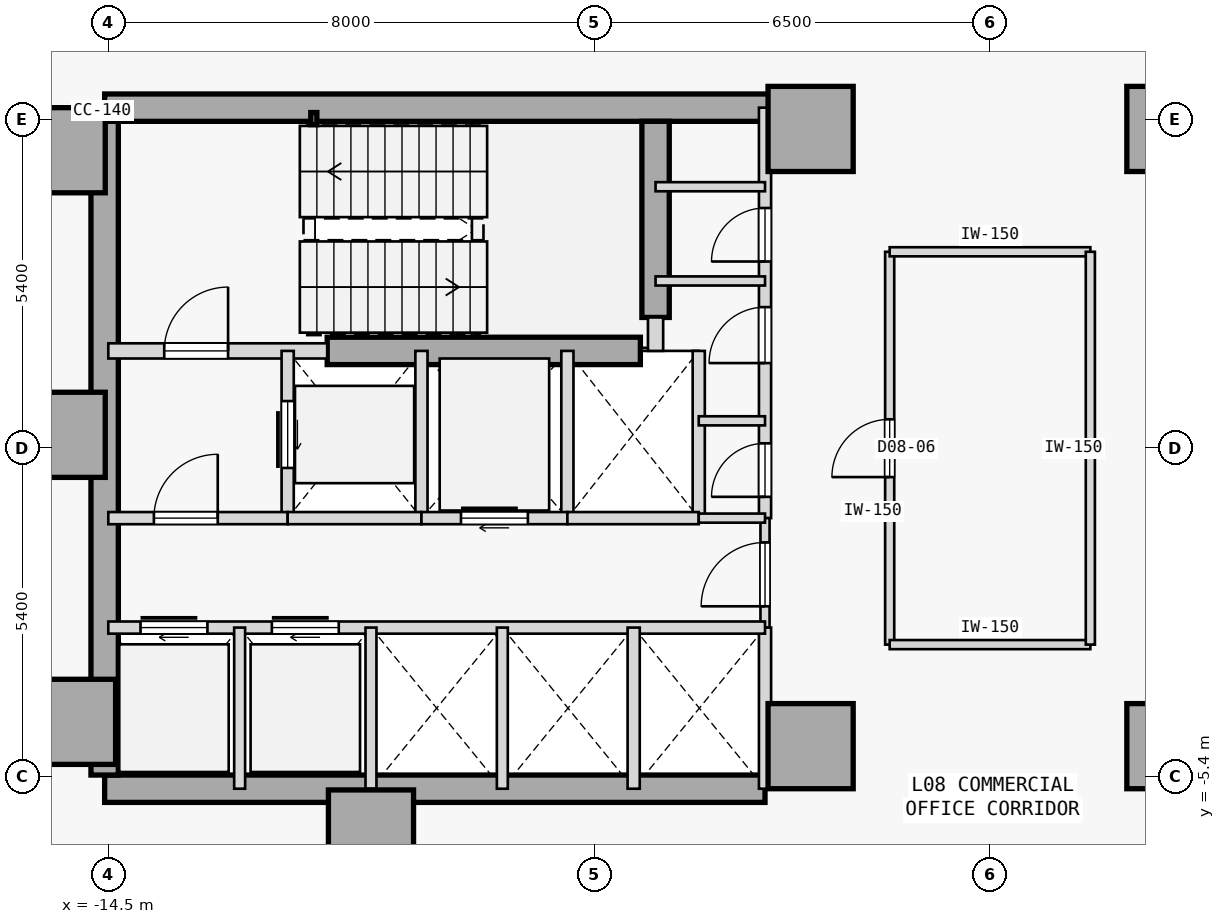
"""IFC4 building model, lengths in metres.
Left out: names, types, materials, properties, quantities, classifications, styles, units other than length and angle.
Written with IfcOpenShell. Run it as: python <this file> out.ifc"""

import sys

from ifc_helpers import new_model, si_unit, direction, frame, frame_2d, origin, origin_2d, place, context, subcontext, project, spatial, rectangle, hollow_rectangle, extrude, element, fill, save


model = new_model("IFC4")
c1 = context("Model", 3, precision=1e-05, world=origin(), true_north=direction((0.0, 1.0)))
c2 = subcontext(c1, "Body", "Model", "MODEL_VIEW")
j1 = project(units=[si_unit("LENGTHUNIT", "METRE"), si_unit("PLANEANGLEUNIT", "RADIAN")], contexts=[c1])
p1 = place(None, origin())
s1 = spatial("IfcSite", under=j1, at=p1, CompositionType="ELEMENT")
p2 = place(p1, origin())
s2 = spatial("IfcBuilding", under=s1, at=p2, CompositionType="ELEMENT")
p3 = place(p2, frame((0.0, 0.0, 37.0)))
s3 = spatial("IfcBuildingStorey", under=s2, at=p3, CompositionType="ELEMENT", Elevation=37.0)
for number, where, z_axis, x_axis in (
    (1, (-15.25, 4.9, 0.0), (0.0, 0.0, 1.0), (1.0, 0.0, 0.0)),
    (2, (-15.25, 0.22, 0.0), (0.0, 0.0, 1.0), (1.0, 0.0, 0.0)),
    (3, (-15.08, -4.5, 0.0), (0.0, 0.0, 1.0), (1.0, 0.0, 0.0)),
    (4, (-10.18, -6.32, 0.0), (0.0, 0.0, 1.0), (1.0, 0.0, 0.0)),
    (5, (-2.95, -4.9, 0.0), (0.0, 0.0, 1.0), (1.0, 0.0, 0.0)),
    (6, (-2.95, 5.25, 0.0), (0.0, 0.0, 1.0), (1.0, 0.0, 0.0)),
    (7, (2.95, -4.9, 0.0), (0.0, 0.0, 1.0), (1.0, 0.0, 0.0)),
    (8, (2.95, 5.25, 0.0), (0.0, 0.0, 1.0), (1.0, 0.0, 0.0)),
):
    element("IfcColumn", number, at=place(p3, frame(where, z_axis=z_axis, x_axis=x_axis)), inside=s3, PredefinedType="COLUMN", context=c2, shape_type="SweptSolid", body=[
        extrude(rectangle(XDim=1.4, YDim=1.4, at=origin_2d()), origin(), (0.0, 0.0, 1.0), 3.8),
    ])
p4 = place(p3, frame((-14.56, 5.6, 0.0), z_axis=(0.0, 0.0, 1.0), x_axis=(1.0, 0.0, 0.0)))
e9 = element("IfcWall", 9, at=p4, inside=s3, PredefinedType="SHEAR", context=c2, shape_type="SweptSolid", body=[
    extrude(rectangle(XDim=11.41, YDim=0.45, at=frame_2d((5.705, 0.0))), origin(), (0.0, 0.0, 1.0), 3.575),
])
p5 = place(p3, frame((-14.56, -5.6, 0.0), z_axis=(0.0, 0.0, 1.0), x_axis=(1.0, 0.0, 0.0)))
e10 = element("IfcWall", 10, at=p5, inside=s3, PredefinedType="SHEAR", context=c2, shape_type="SweptSolid", body=[
    extrude(rectangle(XDim=10.86, YDim=0.45, at=frame_2d((5.43, 0.0))), origin(), (0.0, 0.0, 1.0), 3.575),
])
p6 = place(p3, frame((-14.56, -5.375, 0.0), z_axis=(0.0, 0.0, 1.0), x_axis=(0.0, 1.0, 0.0)))
e11 = element("IfcWall", 11, at=p6, inside=s3, PredefinedType="SHEAR", context=c2, shape_type="SweptSolid", body=[
    extrude(rectangle(XDim=10.75, YDim=0.45, at=frame_2d((5.375, 0.0))), origin(), (0.0, 0.0, 1.0), 3.575),
])
p7 = place(p3, frame((-5.5, 2.15, 0.0), z_axis=(0.0, 0.0, 1.0), x_axis=(0.0, 1.0, 0.0)))
e12 = element("IfcWall", 12, at=p7, inside=s3, PredefinedType="SHEAR", context=c2, shape_type="SweptSolid", body=[
    extrude(rectangle(XDim=3.225, YDim=0.45, at=frame_2d((1.613, 0.0))), origin(), (0.0, 0.0, 1.0), 3.575),
])
p8 = place(p3, frame((-10.9, 1.6, 0.0), z_axis=(0.0, 0.0, 1.0), x_axis=(1.0, 0.0, 0.0)))
e13 = element("IfcWall", 13, at=p8, inside=s3, PredefinedType="SHEAR", context=c2, shape_type="SweptSolid", body=[
    extrude(rectangle(XDim=5.15, YDim=0.45, at=frame_2d((2.575, 0.0))), origin(), (0.0, 0.0, 1.0), 3.575),
])
p9 = place(p3, frame((-11.12, 5.42, 0.0), z_axis=(0.0, 0.0, 1.0), x_axis=(1.0, 0.0, 0.0)))
e14 = element("IfcColumn", 14, at=p9, inside=s3, PredefinedType="COLUMN", context=c2, shape_type="SweptSolid", body=[
    extrude(hollow_rectangle(XDim=0.1, YDim=0.2, WallThickness=0.008, at=origin_2d()), origin(), (0.0, 0.0, 1.0), 3.8),
])
p10 = place(p3, frame((-14.5, 1.6, 0.0), z_axis=(0.0, 0.0, 1.0), x_axis=(1.0, 0.0, 0.0)))
e15 = element("IfcWall", 15, at=p10, inside=s3, PredefinedType="STANDARD", context=c2, shape_type="SweptSolid", body=[
    extrude(rectangle(XDim=3.6, YDim=0.25, at=frame_2d((1.8, 0.0))), origin(), (0.0, 0.0, 1.0), 3.575),
])
p11 = place(p10, frame((0.92, 0.0, 0.0)))
e16 = element("IfcOpeningElement", 16, at=p11, cuts=e15, PredefinedType="OPENING", context=c2, shape_type="SweptSolid", body=[
    extrude(rectangle(XDim=1.05, YDim=2.15, at=frame_2d((0.525, 1.075))), frame((0.0, 0.135, 0.0), z_axis=(0.0, -1.0, 0.0), x_axis=(1.0, 0.0, 0.0)), (0.0, 0.0, 1.0), 0.27),
])
p12 = place(p3, frame((-5.5, 1.6, 0.0), z_axis=(0.0, 0.0, 1.0), x_axis=(0.0, 1.0, 0.0)))
e17 = element("IfcWall", 17, at=p12, inside=s3, PredefinedType="STANDARD", context=c2, shape_type="SweptSolid", body=[
    extrude(rectangle(XDim=0.55, YDim=0.25, at=frame_2d((0.275, 0.0))), origin(), (0.0, 0.0, 1.0), 3.575),
])
p13 = place(p3, frame((-3.7, -1.15, 0.0), z_axis=(0.0, 0.0, 1.0), x_axis=(0.0, 1.0, 0.0)))
e18 = element("IfcWall", 18, at=p13, inside=s3, PredefinedType="STANDARD", context=c2, shape_type="SweptSolid", body=[
    extrude(rectangle(XDim=6.75, YDim=0.2, at=frame_2d((3.375, 0.0))), origin(), (0.0, 0.0, 1.0), 3.575),
])
p14 = place(p13, frame((0.35, 0.0, 0.0)))
e19 = element("IfcOpeningElement", 19, at=p14, cuts=e18, PredefinedType="OPENING", context=c2, shape_type="SweptSolid", body=[
    extrude(rectangle(XDim=0.88, YDim=2.15, at=frame_2d((0.44, 1.075))), frame((0.0, 0.11, 0.0), z_axis=(0.0, -1.0, 0.0), x_axis=(1.0, 0.0, 0.0)), (0.0, 0.0, 1.0), 0.22),
])
p15 = place(p13, frame((2.55, 0.0, 0.0)))
e20 = element("IfcOpeningElement", 20, at=p15, cuts=e18, PredefinedType="OPENING", context=c2, shape_type="SweptSolid", body=[
    extrude(rectangle(XDim=0.92, YDim=2.15, at=frame_2d((0.46, 1.075))), frame((0.0, 0.11, 0.0), z_axis=(0.0, -1.0, 0.0), x_axis=(1.0, 0.0, 0.0)), (0.0, 0.0, 1.0), 0.22),
])
p16 = place(p13, frame((4.22, 0.0, 0.0)))
e21 = element("IfcOpeningElement", 21, at=p16, cuts=e18, PredefinedType="OPENING", context=c2, shape_type="SweptSolid", body=[
    extrude(rectangle(XDim=0.88, YDim=2.15, at=frame_2d((0.44, 1.075))), frame((0.0, 0.11, 0.0), z_axis=(0.0, -1.0, 0.0), x_axis=(1.0, 0.0, 0.0)), (0.0, 0.0, 1.0), 0.22),
])
p17 = place(p3, frame((-3.7, -2.95, 0.0), z_axis=(0.0, 0.0, 1.0), x_axis=(0.0, 1.0, 0.0)))
e22 = element("IfcWall", 22, at=p17, inside=s3, PredefinedType="PARTITIONING", context=c2, shape_type="SweptSolid", body=[
    extrude(rectangle(XDim=1.8, YDim=0.15, at=frame_2d((0.9, 0.0))), origin(), (0.0, 0.0, 1.0), 3.575),
])
p18 = place(p17, frame((0.35, 0.0, 0.0)))
e23 = element("IfcOpeningElement", 23, at=p18, cuts=e22, PredefinedType="OPENING", context=c2, shape_type="SweptSolid", body=[
    extrude(rectangle(XDim=1.05, YDim=2.18, at=frame_2d((0.525, 1.09))), frame((0.0, 0.085, 0.0), z_axis=(0.0, -1.0, 0.0), x_axis=(1.0, 0.0, 0.0)), (0.0, 0.0, 1.0), 0.17),
])
p19 = place(p3, frame((-3.7, -5.6, 0.0), z_axis=(0.0, 0.0, 1.0), x_axis=(0.0, 1.0, 0.0)))
e24 = element("IfcWall", 24, at=p19, inside=s3, PredefinedType="STANDARD", context=c2, shape_type="SweptSolid", body=[
    extrude(rectangle(XDim=2.65, YDim=0.2, at=frame_2d((1.325, 0.0))), origin(), (0.0, 0.0, 1.0), 3.575),
])
p20 = place(p3, frame((-11.55, -1.15, 0.0), z_axis=(0.0, 0.0, 1.0), x_axis=(0.0, 1.0, 0.0)))
e25 = element("IfcWall", 25, at=p20, inside=s3, PredefinedType="STANDARD", context=c2, shape_type="SweptSolid", body=[
    extrude(rectangle(XDim=2.75, YDim=0.2, at=frame_2d((1.375, 0.0))), origin(), (0.0, 0.0, 1.0), 3.575),
])
p21 = place(p20, frame((0.825, 0.0, 0.0)))
e26 = element("IfcOpeningElement", 26, at=p21, cuts=e25, PredefinedType="OPENING", context=c2, shape_type="SweptSolid", body=[
    extrude(rectangle(XDim=1.1, YDim=2.15, at=frame_2d((0.55, 1.075))), frame((0.0, 0.11, 0.0), z_axis=(0.0, -1.0, 0.0), x_axis=(1.0, 0.0, 0.0)), (0.0, 0.0, 1.0), 0.22),
])
p22 = place(p3, frame((-9.35, -1.15, 0.0), z_axis=(0.0, 0.0, 1.0), x_axis=(0.0, 1.0, 0.0)))
e27 = element("IfcWall", 27, at=p22, inside=s3, PredefinedType="STANDARD", context=c2, shape_type="SweptSolid", body=[
    extrude(rectangle(XDim=2.75, YDim=0.2, at=frame_2d((1.375, 0.0))), origin(), (0.0, 0.0, 1.0), 3.575),
])
p23 = place(p3, frame((-14.5, -1.15, 0.0), z_axis=(0.0, 0.0, 1.0), x_axis=(1.0, 0.0, 0.0)))
e28 = element("IfcWall", 28, at=p23, inside=s3, PredefinedType="STANDARD", context=c2, shape_type="SweptSolid", body=[
    extrude(rectangle(XDim=2.95, YDim=0.2, at=frame_2d((1.475, 0.0))), origin(), (0.0, 0.0, 1.0), 3.575),
])
p24 = place(p23, frame((0.75, 0.0, 0.0)))
e29 = element("IfcOpeningElement", 29, at=p24, cuts=e28, PredefinedType="OPENING", context=c2, shape_type="SweptSolid", body=[
    extrude(rectangle(XDim=1.05, YDim=2.18, at=frame_2d((0.525, 1.09))), frame((0.0, 0.11, 0.0), z_axis=(0.0, -1.0, 0.0), x_axis=(1.0, 0.0, 0.0)), (0.0, 0.0, 1.0), 0.22),
])
p25 = place(p3, frame((-11.55, -1.15, 0.0), z_axis=(0.0, 0.0, 1.0), x_axis=(1.0, 0.0, 0.0)))
e30 = element("IfcWall", 30, at=p25, inside=s3, PredefinedType="STANDARD", context=c2, shape_type="SweptSolid", body=[
    extrude(rectangle(XDim=2.2, YDim=0.2, at=frame_2d((1.1, 0.0))), origin(), (0.0, 0.0, 1.0), 3.575),
])
p26 = place(p3, frame((-6.95, -1.15, 0.0), z_axis=(0.0, 0.0, 1.0), x_axis=(0.0, 1.0, 0.0)))
e31 = element("IfcWall", 31, at=p26, inside=s3, PredefinedType="STANDARD", context=c2, shape_type="SweptSolid", body=[
    extrude(rectangle(XDim=2.75, YDim=0.2, at=frame_2d((1.375, 0.0))), origin(), (0.0, 0.0, 1.0), 3.575),
])
p27 = place(p3, frame((-9.35, -1.15, 0.0), z_axis=(0.0, 0.0, 1.0), x_axis=(1.0, 0.0, 0.0)))
e32 = element("IfcWall", 32, at=p27, inside=s3, PredefinedType="STANDARD", context=c2, shape_type="SweptSolid", body=[
    extrude(rectangle(XDim=2.4, YDim=0.2, at=frame_2d((1.2, 0.0))), origin(), (0.0, 0.0, 1.0), 3.575),
])
p28 = place(p27, frame((0.65, 0.0, 0.0)))
e33 = element("IfcOpeningElement", 33, at=p28, cuts=e32, PredefinedType="OPENING", context=c2, shape_type="SweptSolid", body=[
    extrude(rectangle(XDim=1.1, YDim=2.15, at=frame_2d((0.55, 1.075))), frame((0.0, 0.11, 0.0), z_axis=(0.0, -1.0, 0.0), x_axis=(1.0, 0.0, 0.0)), (0.0, 0.0, 1.0), 0.22),
])
p29 = place(p3, frame((-4.79, -1.15, 0.0), z_axis=(0.0, 0.0, 1.0), x_axis=(0.0, 1.0, 0.0)))
e34 = element("IfcWall", 34, at=p29, inside=s3, PredefinedType="STANDARD", context=c2, shape_type="SweptSolid", body=[
    extrude(rectangle(XDim=2.75, YDim=0.2, at=frame_2d((1.375, 0.0))), origin(), (0.0, 0.0, 1.0), 3.575),
])
p30 = place(p3, frame((-6.95, -1.15, 0.0), z_axis=(0.0, 0.0, 1.0), x_axis=(1.0, 0.0, 0.0)))
e35 = element("IfcWall", 35, at=p30, inside=s3, PredefinedType="STANDARD", context=c2, shape_type="SweptSolid", body=[
    extrude(rectangle(XDim=2.16, YDim=0.2, at=frame_2d((1.08, 0.0))), origin(), (0.0, 0.0, 1.0), 3.575),
])
p31 = place(p3, frame((-4.79, -1.15, 0.0), z_axis=(0.0, 0.0, 1.0), x_axis=(1.0, 0.0, 0.0)))
e36 = element("IfcWall", 36, at=p31, inside=s3, PredefinedType="PARTITIONING", context=c2, shape_type="SweptSolid", body=[
    extrude(rectangle(XDim=1.09, YDim=0.15, at=frame_2d((0.545, 0.0))), origin(), (0.0, 0.0, 1.0), 3.575),
])
p32 = place(p3, frame((-14.5, -2.95, 0.0), z_axis=(0.0, 0.0, 1.0), x_axis=(1.0, 0.0, 0.0)))
e37 = element("IfcWall", 37, at=p32, inside=s3, PredefinedType="STANDARD", context=c2, shape_type="SweptSolid", body=[
    extrude(rectangle(XDim=10.8, YDim=0.2, at=frame_2d((5.4, 0.0))), origin(), (0.0, 0.0, 1.0), 3.575),
])
p33 = place(p32, frame((0.53, 0.0, 0.0)))
e38 = element("IfcOpeningElement", 38, at=p33, cuts=e37, PredefinedType="OPENING", context=c2, shape_type="SweptSolid", body=[
    extrude(rectangle(XDim=1.1, YDim=2.15, at=frame_2d((0.55, 1.075))), frame((0.0, 0.11, 0.0), z_axis=(0.0, -1.0, 0.0), x_axis=(1.0, 0.0, 0.0)), (0.0, 0.0, 1.0), 0.22),
])
p34 = place(p32, frame((2.69, 0.0, 0.0)))
e39 = element("IfcOpeningElement", 39, at=p34, cuts=e37, PredefinedType="OPENING", context=c2, shape_type="SweptSolid", body=[
    extrude(rectangle(XDim=1.1, YDim=2.15, at=frame_2d((0.55, 1.075))), frame((0.0, 0.11, 0.0), z_axis=(0.0, -1.0, 0.0), x_axis=(1.0, 0.0, 0.0)), (0.0, 0.0, 1.0), 0.22),
])
p35 = place(p3, frame((-5.86, -5.6, 0.0), z_axis=(0.0, 0.0, 1.0), x_axis=(0.0, 1.0, 0.0)))
e40 = element("IfcWall", 40, at=p35, inside=s3, PredefinedType="STANDARD", context=c2, shape_type="SweptSolid", body=[
    extrude(rectangle(XDim=2.65, YDim=0.2, at=frame_2d((1.325, 0.0))), origin(), (0.0, 0.0, 1.0), 3.575),
])
for number, where, z_axis, x_axis in (
    (41, (-12.34, -5.6, 0.0), (0.0, 0.0, 1.0), (0.0, 1.0, 0.0)),
    (42, (-10.18, -5.6, 0.0), (0.0, 0.0, 1.0), (0.0, 1.0, 0.0)),
    (43, (-8.02, -5.6, 0.0), (0.0, 0.0, 1.0), (0.0, 1.0, 0.0)),
):
    element("IfcWall", number, at=place(p3, frame(where, z_axis=z_axis, x_axis=x_axis)), inside=s3, PredefinedType="STANDARD", context=c2, shape_type="SweptSolid", body=[
        extrude(rectangle(XDim=2.65, YDim=0.18, at=frame_2d((1.325, 0.0))), origin(), (0.0, 0.0, 1.0), 3.575),
    ])
p36 = place(p3, frame((-5.5, 4.3, 0.0), z_axis=(0.0, 0.0, 1.0), x_axis=(1.0, 0.0, 0.0)))
e44 = element("IfcWall", 44, at=p36, inside=s3, PredefinedType="PARTITIONING", context=c2, shape_type="SweptSolid", body=[
    extrude(rectangle(XDim=1.8, YDim=0.15, at=frame_2d((0.9, 0.0))), origin(), (0.0, 0.0, 1.0), 3.575),
])
p37 = place(p3, frame((-4.79, 0.45, 0.0), z_axis=(0.0, 0.0, 1.0), x_axis=(1.0, 0.0, 0.0)))
e45 = element("IfcWall", 45, at=p37, inside=s3, PredefinedType="PARTITIONING", context=c2, shape_type="SweptSolid", body=[
    extrude(rectangle(XDim=1.09, YDim=0.15, at=frame_2d((0.545, 0.0))), origin(), (0.0, 0.0, 1.0), 3.575),
])
p38 = place(p3, frame((-5.5, 2.75, 0.0), z_axis=(0.0, 0.0, 1.0), x_axis=(1.0, 0.0, 0.0)))
e46 = element("IfcWall", 46, at=p38, inside=s3, PredefinedType="PARTITIONING", context=c2, shape_type="SweptSolid", body=[
    extrude(rectangle(XDim=1.8, YDim=0.15, at=frame_2d((0.9, 0.0))), origin(), (0.0, 0.0, 1.0), 3.575),
])
p39 = place(p3, frame((-1.65, -3.23, 0.0), z_axis=(0.0, 0.0, 1.0), x_axis=(0.0, 1.0, 0.0)))
e47 = element("IfcWall", 47, at=p39, inside=s3, PredefinedType="PARTITIONING", context=c2, shape_type="SweptSolid", body=[
    extrude(rectangle(XDim=6.46, YDim=0.15, at=frame_2d((3.23, 0.0))), origin(), (0.0, 0.0, 1.0), 3.575),
])
p40 = place(p39, frame((2.755, 0.0, 0.0)))
e48 = element("IfcOpeningElement", 48, at=p40, cuts=e47, PredefinedType="OPENING", context=c2, shape_type="SweptSolid", body=[
    extrude(rectangle(XDim=0.95, YDim=2.15, at=frame_2d((0.475, 1.075))), frame((0.0, 0.085, 0.0), z_axis=(0.0, -1.0, 0.0), x_axis=(1.0, 0.0, 0.0)), (0.0, 0.0, 1.0), 0.17),
])
for number, where, z_axis, x_axis in (
    (49, (-1.65, -3.23, 0.0), (0.0, 0.0, 1.0), (1.0, 0.0, 0.0)),
    (50, (-1.65, 3.23, 0.0), (0.0, 0.0, 1.0), (1.0, 0.0, 0.0)),
):
    element("IfcWall", number, at=place(p3, frame(where, z_axis=z_axis, x_axis=x_axis)), inside=s3, PredefinedType="PARTITIONING", context=c2, shape_type="SweptSolid", body=[
        extrude(rectangle(XDim=3.3, YDim=0.15, at=frame_2d((1.65, 0.0))), origin(), (0.0, 0.0, 1.0), 3.575),
    ])
p41 = place(p3, frame((1.65, -3.23, 0.0), z_axis=(0.0, 0.0, 1.0), x_axis=(0.0, 1.0, 0.0)))
e51 = element("IfcWall", 51, at=p41, inside=s3, PredefinedType="PARTITIONING", context=c2, shape_type="SweptSolid", body=[
    extrude(rectangle(XDim=6.46, YDim=0.15, at=frame_2d((3.23, 0.0))), origin(), (0.0, 0.0, 1.0), 3.575),
])
p42 = place(p11, origin())
e52 = element("IfcDoor", 52, at=p42, inside=s3, OperationType="SINGLE_SWING_RIGHT", PredefinedType="DOOR", context=c2, shape_type="SweptSolid", body=[
    extrude(rectangle(XDim=1.05, YDim=2.15, at=frame_2d((0.525, 1.075))), frame((0.0, 0.025, 0.0), z_axis=(0.0, -1.0, 0.0), x_axis=(1.0, 0.0, 0.0)), (0.0, 0.0, 1.0), 0.05),
])
fill(e16, e52)
p43 = place(p24, origin())
e53 = element("IfcDoor", 53, at=p43, inside=s3, OperationType="SINGLE_SWING_RIGHT", PredefinedType="DOOR", context=c2, shape_type="SweptSolid", body=[
    extrude(rectangle(XDim=1.05, YDim=2.18, at=frame_2d((0.525, 1.09))), frame((0.0, 0.025, 0.0), z_axis=(0.0, -1.0, 0.0), x_axis=(1.0, 0.0, 0.0)), (0.0, 0.0, 1.0), 0.05),
])
fill(e29, e53)
p44 = place(p18, origin())
e54 = element("IfcDoor", 54, at=p44, inside=s3, OperationType="SINGLE_SWING_LEFT", PredefinedType="DOOR", context=c2, shape_type="SweptSolid", body=[
    extrude(rectangle(XDim=1.05, YDim=2.18, at=frame_2d((0.525, 1.09))), frame((0.0, 0.025, 0.0), z_axis=(0.0, -1.0, 0.0), x_axis=(1.0, 0.0, 0.0)), (0.0, 0.0, 1.0), 0.05),
])
fill(e23, e54)
p45 = place(p21, origin())
e55 = element("IfcDoor", 55, at=p45, inside=s3, OperationType="SLIDING_TO_RIGHT", PredefinedType="DOOR", context=c2, shape_type="SweptSolid", body=[
    extrude(rectangle(XDim=1.1, YDim=2.15, at=frame_2d((0.55, 1.075))), frame((0.0, 0.025, 0.0), z_axis=(0.0, -1.0, 0.0), x_axis=(1.0, 0.0, 0.0)), (0.0, 0.0, 1.0), 0.05),
])
fill(e26, e55)
p46 = place(p28, origin())
e56 = element("IfcDoor", 56, at=p46, inside=s3, OperationType="SLIDING_TO_RIGHT", PredefinedType="DOOR", context=c2, shape_type="SweptSolid", body=[
    extrude(rectangle(XDim=1.1, YDim=2.15, at=frame_2d((0.55, 1.075))), frame((0.0, 0.025, 0.0), z_axis=(0.0, -1.0, 0.0), x_axis=(1.0, 0.0, 0.0)), (0.0, 0.0, 1.0), 0.05),
])
fill(e33, e56)
p47 = place(p33, origin())
e57 = element("IfcDoor", 57, at=p47, inside=s3, OperationType="SLIDING_TO_RIGHT", PredefinedType="DOOR", context=c2, shape_type="SweptSolid", body=[
    extrude(rectangle(XDim=1.1, YDim=2.15, at=frame_2d((0.55, 1.075))), frame((0.0, 0.025, 0.0), z_axis=(0.0, -1.0, 0.0), x_axis=(1.0, 0.0, 0.0)), (0.0, 0.0, 1.0), 0.05),
])
fill(e38, e57)
p48 = place(p34, origin())
e58 = element("IfcDoor", 58, at=p48, inside=s3, OperationType="SLIDING_TO_RIGHT", PredefinedType="DOOR", context=c2, shape_type="SweptSolid", body=[
    extrude(rectangle(XDim=1.1, YDim=2.15, at=frame_2d((0.55, 1.075))), frame((0.0, 0.025, 0.0), z_axis=(0.0, -1.0, 0.0), x_axis=(1.0, 0.0, 0.0)), (0.0, 0.0, 1.0), 0.05),
])
fill(e39, e58)
p49 = place(p14, origin())
e59 = element("IfcDoor", 59, at=p49, inside=s3, OperationType="SINGLE_SWING_LEFT", PredefinedType="DOOR", context=c2, shape_type="SweptSolid", body=[
    extrude(rectangle(XDim=0.88, YDim=2.15, at=frame_2d((0.44, 1.075))), frame((0.0, 0.025, 0.0), z_axis=(0.0, -1.0, 0.0), x_axis=(1.0, 0.0, 0.0)), (0.0, 0.0, 1.0), 0.05),
])
fill(e19, e59)
p50 = place(p15, origin())
e60 = element("IfcDoor", 60, at=p50, inside=s3, OperationType="SINGLE_SWING_LEFT", PredefinedType="DOOR", context=c2, shape_type="SweptSolid", body=[
    extrude(rectangle(XDim=0.92, YDim=2.15, at=frame_2d((0.46, 1.075))), frame((0.0, 0.025, 0.0), z_axis=(0.0, -1.0, 0.0), x_axis=(1.0, 0.0, 0.0)), (0.0, 0.0, 1.0), 0.05),
])
fill(e20, e60)
p51 = place(p16, origin())
e61 = element("IfcDoor", 61, at=p51, inside=s3, OperationType="SINGLE_SWING_LEFT", PredefinedType="DOOR", context=c2, shape_type="SweptSolid", body=[
    extrude(rectangle(XDim=0.88, YDim=2.15, at=frame_2d((0.44, 1.075))), frame((0.0, 0.025, 0.0), z_axis=(0.0, -1.0, 0.0), x_axis=(1.0, 0.0, 0.0)), (0.0, 0.0, 1.0), 0.05),
])
fill(e21, e61)
p52 = place(p40, origin())
e62 = element("IfcDoor", 62, at=p52, inside=s3, OperationType="SINGLE_SWING_LEFT", PredefinedType="DOOR", context=c2, shape_type="SweptSolid", body=[
    extrude(rectangle(XDim=0.95, YDim=2.15, at=frame_2d((0.475, 1.075))), frame((0.0, 0.025, 0.0), z_axis=(0.0, -1.0, 0.0), x_axis=(1.0, 0.0, 0.0)), (0.0, 0.0, 1.0), 0.05),
])
fill(e48, e62)
save(model, sys.argv[1])
